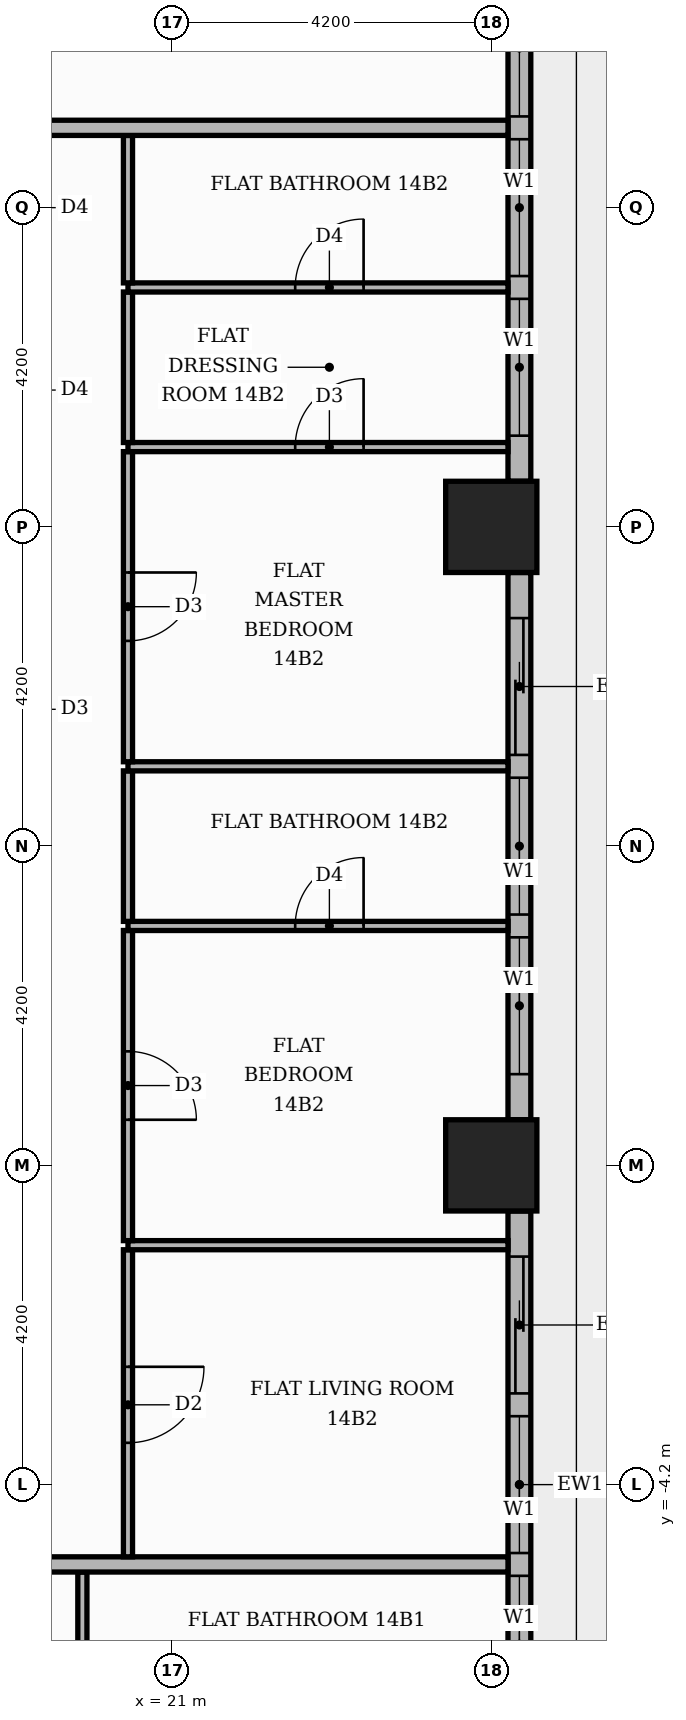
"""IFC4 building model, lengths in metres.
Left out: names, types, materials, properties, quantities, classifications, styles, units other than length and angle.
Written with IfcOpenShell. Run it as: python <this file> out.ifc"""

import sys

from ifc_helpers import new_model, si_unit, direction, frame, frame_2d, origin, origin_2d, place, context, subcontext, project, spatial, rectangle, extrude, element, fill, save


model = new_model("IFC4")
c1 = context("Model", 3, precision=1e-05, world=origin(), true_north=direction((0.0, 1.0)))
c2 = subcontext(c1, "Body", "Model", "MODEL_VIEW")
j1 = project(units=[si_unit("LENGTHUNIT", "METRE"), si_unit("PLANEANGLEUNIT", "RADIAN")], contexts=[c1])
p1 = place(None, origin())
s1 = spatial("IfcSite", under=j1, at=p1, CompositionType="ELEMENT")
p2 = place(p1, origin())
s2 = spatial("IfcBuilding", under=s1, at=p2, CompositionType="ELEMENT")
p3 = place(p2, frame((0.0, 0.0, 62.1)))
s3 = spatial("IfcBuildingStorey", under=s2, at=p3, CompositionType="ELEMENT", Elevation=62.1)
for number, where, z_axis, x_axis in (
    (1, (25.2, 0.0, 0.0), (0.0, 0.0, 1.0), (1.0, 0.0, 0.0)),
    (2, (25.2, 8.4, 0.0), (0.0, 0.0, 1.0), (1.0, 0.0, 0.0)),
):
    element("IfcColumn", number, at=place(p3, frame(where, z_axis=z_axis, x_axis=x_axis)), inside=s3, PredefinedType="COLUMN", context=c2, shape_type="SweptSolid", body=[
        extrude(rectangle(XDim=1.2, YDim=1.2, at=origin_2d()), origin(), (0.0, 0.0, 1.0), 3.9),
    ])
p4 = place(p3, frame((25.57, -7.8, 0.0), z_axis=(0.0, 0.0, 1.0), x_axis=(0.0, 1.0, 0.0)))
e3 = element("IfcWall", 3, at=p4, inside=s3, PredefinedType="STANDARD", context=c2, shape_type="SweptSolid", body=[
    extrude(rectangle(XDim=7.2, YDim=0.3, at=frame_2d((3.6, 0.0))), origin(), (0.0, 0.0, 1.0), 3.48),
])
p5 = place(p4, frame((0.6, 0.0, 0.9)))
e4 = element("IfcOpeningElement", 4, at=p5, cuts=e3, PredefinedType="OPENING", context=c2, shape_type="SweptSolid", body=[
    extrude(rectangle(XDim=1.8, YDim=2.1, at=frame_2d((0.9, 1.05))), frame((0.0, 0.16, 0.0), z_axis=(0.0, -1.0, 0.0), x_axis=(1.0, 0.0, 0.0)), (0.0, 0.0, 1.0), 0.32),
])
p6 = place(p4, frame((2.7, 0.0, 0.9)))
e5 = element("IfcOpeningElement", 5, at=p6, cuts=e3, PredefinedType="OPENING", context=c2, shape_type="SweptSolid", body=[
    extrude(rectangle(XDim=1.8, YDim=2.1, at=frame_2d((0.9, 1.05))), frame((0.0, 0.16, 0.0), z_axis=(0.0, -1.0, 0.0), x_axis=(1.0, 0.0, 0.0)), (0.0, 0.0, 1.0), 0.32),
])
p7 = place(p4, frame((4.8, 0.0, 0.0)))
e6 = element("IfcOpeningElement", 6, at=p7, cuts=e3, PredefinedType="OPENING", context=c2, shape_type="SweptSolid", body=[
    extrude(rectangle(XDim=1.8, YDim=2.4, at=frame_2d((0.9, 1.2))), frame((0.0, 0.16, 0.0), z_axis=(0.0, -1.0, 0.0), x_axis=(1.0, 0.0, 0.0)), (0.0, 0.0, 1.0), 0.32),
])
p8 = place(p3, frame((25.57, 0.6, 0.0), z_axis=(0.0, 0.0, 1.0), x_axis=(0.0, 1.0, 0.0)))
e7 = element("IfcWall", 7, at=p8, inside=s3, PredefinedType="STANDARD", context=c2, shape_type="SweptSolid", body=[
    extrude(rectangle(XDim=7.2, YDim=0.3, at=frame_2d((3.6, 0.0))), origin(), (0.0, 0.0, 1.0), 3.48),
])
p9 = place(p8, frame((0.6, 0.0, 0.9)))
e8 = element("IfcOpeningElement", 8, at=p9, cuts=e7, PredefinedType="OPENING", context=c2, shape_type="SweptSolid", body=[
    extrude(rectangle(XDim=1.8, YDim=2.1, at=frame_2d((0.9, 1.05))), frame((0.0, 0.16, 0.0), z_axis=(0.0, -1.0, 0.0), x_axis=(1.0, 0.0, 0.0)), (0.0, 0.0, 1.0), 0.32),
])
p10 = place(p8, frame((2.7, 0.0, 0.9)))
e9 = element("IfcOpeningElement", 9, at=p10, cuts=e7, PredefinedType="OPENING", context=c2, shape_type="SweptSolid", body=[
    extrude(rectangle(XDim=1.8, YDim=2.1, at=frame_2d((0.9, 1.05))), frame((0.0, 0.16, 0.0), z_axis=(0.0, -1.0, 0.0), x_axis=(1.0, 0.0, 0.0)), (0.0, 0.0, 1.0), 0.32),
])
p11 = place(p8, frame((4.8, 0.0, 0.0)))
e10 = element("IfcOpeningElement", 10, at=p11, cuts=e7, PredefinedType="OPENING", context=c2, shape_type="SweptSolid", body=[
    extrude(rectangle(XDim=1.8, YDim=2.4, at=frame_2d((0.9, 1.2))), frame((0.0, 0.16, 0.0), z_axis=(0.0, -1.0, 0.0), x_axis=(1.0, 0.0, 0.0)), (0.0, 0.0, 1.0), 0.32),
])
p12 = place(p3, frame((25.57, 9.0, 0.0), z_axis=(0.0, 0.0, 1.0), x_axis=(0.0, 1.0, 0.0)))
e11 = element("IfcWall", 11, at=p12, inside=s3, PredefinedType="STANDARD", context=c2, shape_type="SweptSolid", body=[
    extrude(rectangle(XDim=7.2, YDim=0.3, at=frame_2d((3.6, 0.0))), origin(), (0.0, 0.0, 1.0), 3.48),
])
p13 = place(p12, frame((0.6, 0.0, 0.9)))
e12 = element("IfcOpeningElement", 12, at=p13, cuts=e11, PredefinedType="OPENING", context=c2, shape_type="SweptSolid", body=[
    extrude(rectangle(XDim=1.8, YDim=2.1, at=frame_2d((0.9, 1.05))), frame((0.0, 0.16, 0.0), z_axis=(0.0, -1.0, 0.0), x_axis=(1.0, 0.0, 0.0)), (0.0, 0.0, 1.0), 0.32),
])
p14 = place(p12, frame((2.7, 0.0, 0.9)))
e13 = element("IfcOpeningElement", 13, at=p14, cuts=e11, PredefinedType="OPENING", context=c2, shape_type="SweptSolid", body=[
    extrude(rectangle(XDim=1.8, YDim=2.1, at=frame_2d((0.9, 1.05))), frame((0.0, 0.16, 0.0), z_axis=(0.0, -1.0, 0.0), x_axis=(1.0, 0.0, 0.0)), (0.0, 0.0, 1.0), 0.32),
])
p15 = place(p12, frame((4.8, 0.0, 0.9)))
e14 = element("IfcOpeningElement", 14, at=p15, cuts=e11, PredefinedType="OPENING", context=c2, shape_type="SweptSolid", body=[
    extrude(rectangle(XDim=1.8, YDim=2.1, at=frame_2d((0.9, 1.05))), frame((0.0, 0.16, 0.0), z_axis=(0.0, -1.0, 0.0), x_axis=(1.0, 0.0, 0.0)), (0.0, 0.0, 1.0), 0.32),
])
p16 = place(p3, frame((19.82, -7.29, 0.0), z_axis=(0.0, 0.0, 1.0), x_axis=(0.0, 1.0, 0.0)))
e15 = element("IfcWall", 15, at=p16, inside=s3, PredefinedType="PARTITIONING", context=c2, shape_type="SweptSolid", body=[
    extrude(rectangle(XDim=1.94, YDim=0.12, at=frame_2d((0.97, 0.0))), origin(), (0.0, 0.0, 1.0), 3.48),
])
p17 = place(p3, frame((13.65, -5.25, 0.0), z_axis=(0.0, 0.0, 1.0), x_axis=(1.0, 0.0, 0.0)))
e16 = element("IfcWall", 16, at=p17, inside=s3, PredefinedType="PARTITIONING", context=c2, shape_type="SweptSolid", body=[
    extrude(rectangle(XDim=11.77, YDim=0.2, at=frame_2d((5.885, 0.0))), origin(), (0.0, 0.0, 1.0), 3.48),
])
p18 = place(p3, frame((20.42, -5.15, 0.0), z_axis=(0.0, 0.0, 1.0), x_axis=(0.0, 1.0, 0.0)))
e17 = element("IfcWall", 17, at=p18, inside=s3, PredefinedType="PARTITIONING", context=c2, shape_type="SweptSolid", body=[
    extrude(rectangle(XDim=4.04, YDim=0.12, at=frame_2d((2.02, 0.0))), origin(), (0.0, 0.0, 1.0), 3.48),
])
p19 = place(p18, frame((1.5, 0.0, 0.0)))
e18 = element("IfcOpeningElement", 18, at=p19, cuts=e17, PredefinedType="OPENING", context=c2, shape_type="SweptSolid", body=[
    extrude(rectangle(XDim=1.0, YDim=2.1, at=frame_2d((0.5, 1.05))), frame((0.0, 0.07, 0.0), z_axis=(0.0, -1.0, 0.0), x_axis=(1.0, 0.0, 0.0)), (0.0, 0.0, 1.0), 0.14),
])
p20 = place(p3, frame((20.42, -1.05, 0.0), z_axis=(0.0, 0.0, 1.0), x_axis=(1.0, 0.0, 0.0)))
e19 = element("IfcWall", 19, at=p20, inside=s3, PredefinedType="PARTITIONING", context=c2, shape_type="SweptSolid", body=[
    extrude(rectangle(XDim=5.0, YDim=0.12, at=frame_2d((2.5, 0.0))), origin(), (0.0, 0.0, 1.0), 3.48),
])
p21 = place(p3, frame((20.42, -0.99, 0.0), z_axis=(0.0, 0.0, 1.0), x_axis=(0.0, 1.0, 0.0)))
e20 = element("IfcWall", 20, at=p21, inside=s3, PredefinedType="PARTITIONING", context=c2, shape_type="SweptSolid", body=[
    extrude(rectangle(XDim=4.08, YDim=0.12, at=frame_2d((2.04, 0.0))), origin(), (0.0, 0.0, 1.0), 3.48),
])
p22 = place(p21, frame((1.59, 0.0, 0.0)))
e21 = element("IfcOpeningElement", 21, at=p22, cuts=e20, PredefinedType="OPENING", context=c2, shape_type="SweptSolid", body=[
    extrude(rectangle(XDim=0.9, YDim=2.1, at=frame_2d((0.45, 1.05))), frame((0.0, 0.07, 0.0), z_axis=(0.0, -1.0, 0.0), x_axis=(1.0, 0.0, 0.0)), (0.0, 0.0, 1.0), 0.14),
])
p23 = place(p3, frame((20.42, 3.15, 0.0), z_axis=(0.0, 0.0, 1.0), x_axis=(1.0, 0.0, 0.0)))
e22 = element("IfcWall", 22, at=p23, inside=s3, PredefinedType="PARTITIONING", context=c2, shape_type="SweptSolid", body=[
    extrude(rectangle(XDim=5.0, YDim=0.12, at=frame_2d((2.5, 0.0))), origin(), (0.0, 0.0, 1.0), 3.48),
])
p24 = place(p23, frame((2.2, 0.0, 0.0)))
e23 = element("IfcOpeningElement", 23, at=p24, cuts=e22, PredefinedType="OPENING", context=c2, shape_type="SweptSolid", body=[
    extrude(rectangle(XDim=0.9, YDim=2.1, at=frame_2d((0.45, 1.05))), frame((0.0, 0.07, 0.0), z_axis=(0.0, -1.0, 0.0), x_axis=(1.0, 0.0, 0.0)), (0.0, 0.0, 1.0), 0.14),
])
p25 = place(p3, frame((20.42, 3.21, 0.0), z_axis=(0.0, 0.0, 1.0), x_axis=(0.0, 1.0, 0.0)))
e24 = element("IfcWall", 24, at=p25, inside=s3, PredefinedType="PARTITIONING", context=c2, shape_type="SweptSolid", body=[
    extrude(rectangle(XDim=1.98, YDim=0.12, at=frame_2d((0.99, 0.0))), origin(), (0.0, 0.0, 1.0), 3.48),
])
p26 = place(p3, frame((20.42, 5.25, 0.0), z_axis=(0.0, 0.0, 1.0), x_axis=(1.0, 0.0, 0.0)))
e25 = element("IfcWall", 25, at=p26, inside=s3, PredefinedType="PARTITIONING", context=c2, shape_type="SweptSolid", body=[
    extrude(rectangle(XDim=5.0, YDim=0.12, at=frame_2d((2.5, 0.0))), origin(), (0.0, 0.0, 1.0), 3.48),
])
p27 = place(p3, frame((20.42, 5.31, 0.0), z_axis=(0.0, 0.0, 1.0), x_axis=(0.0, 1.0, 0.0)))
e26 = element("IfcWall", 26, at=p27, inside=s3, PredefinedType="PARTITIONING", context=c2, shape_type="SweptSolid", body=[
    extrude(rectangle(XDim=4.08, YDim=0.12, at=frame_2d((2.04, 0.0))), origin(), (0.0, 0.0, 1.0), 3.48),
])
p28 = place(p27, frame((1.59, 0.0, 0.0)))
e27 = element("IfcOpeningElement", 27, at=p28, cuts=e26, PredefinedType="OPENING", context=c2, shape_type="SweptSolid", body=[
    extrude(rectangle(XDim=0.9, YDim=2.1, at=frame_2d((0.45, 1.05))), frame((0.0, 0.07, 0.0), z_axis=(0.0, -1.0, 0.0), x_axis=(1.0, 0.0, 0.0)), (0.0, 0.0, 1.0), 0.14),
])
p29 = place(p3, frame((20.42, 9.45, 0.0), z_axis=(0.0, 0.0, 1.0), x_axis=(1.0, 0.0, 0.0)))
e28 = element("IfcWall", 28, at=p29, inside=s3, PredefinedType="PARTITIONING", context=c2, shape_type="SweptSolid", body=[
    extrude(rectangle(XDim=5.0, YDim=0.12, at=frame_2d((2.5, 0.0))), origin(), (0.0, 0.0, 1.0), 3.48),
])
p30 = place(p29, frame((2.2, 0.0, 0.0)))
e29 = element("IfcOpeningElement", 29, at=p30, cuts=e28, PredefinedType="OPENING", context=c2, shape_type="SweptSolid", body=[
    extrude(rectangle(XDim=0.9, YDim=2.1, at=frame_2d((0.45, 1.05))), frame((0.0, 0.07, 0.0), z_axis=(0.0, -1.0, 0.0), x_axis=(1.0, 0.0, 0.0)), (0.0, 0.0, 1.0), 0.14),
])
p31 = place(p3, frame((20.42, 9.51, 0.0), z_axis=(0.0, 0.0, 1.0), x_axis=(0.0, 1.0, 0.0)))
e30 = element("IfcWall", 30, at=p31, inside=s3, PredefinedType="PARTITIONING", context=c2, shape_type="SweptSolid", body=[
    extrude(rectangle(XDim=1.98, YDim=0.12, at=frame_2d((0.99, 0.0))), origin(), (0.0, 0.0, 1.0), 3.48),
])
p32 = place(p3, frame((20.42, 11.55, 0.0), z_axis=(0.0, 0.0, 1.0), x_axis=(1.0, 0.0, 0.0)))
e31 = element("IfcWall", 31, at=p32, inside=s3, PredefinedType="PARTITIONING", context=c2, shape_type="SweptSolid", body=[
    extrude(rectangle(XDim=5.0, YDim=0.12, at=frame_2d((2.5, 0.0))), origin(), (0.0, 0.0, 1.0), 3.48),
])
p33 = place(p32, frame((2.2, 0.0, 0.0)))
e32 = element("IfcOpeningElement", 32, at=p33, cuts=e31, PredefinedType="OPENING", context=c2, shape_type="SweptSolid", body=[
    extrude(rectangle(XDim=0.9, YDim=2.1, at=frame_2d((0.45, 1.05))), frame((0.0, 0.07, 0.0), z_axis=(0.0, -1.0, 0.0), x_axis=(1.0, 0.0, 0.0)), (0.0, 0.0, 1.0), 0.14),
])
p34 = place(p3, frame((20.42, 11.61, 0.0), z_axis=(0.0, 0.0, 1.0), x_axis=(0.0, 1.0, 0.0)))
e33 = element("IfcWall", 33, at=p34, inside=s3, PredefinedType="PARTITIONING", context=c2, shape_type="SweptSolid", body=[
    extrude(rectangle(XDim=1.94, YDim=0.12, at=frame_2d((0.97, 0.0))), origin(), (0.0, 0.0, 1.0), 3.48),
])
p35 = place(p3, frame((-13.65, 13.65, 0.0), z_axis=(0.0, 0.0, 1.0), x_axis=(1.0, 0.0, 0.0)))
e34 = element("IfcWall", 34, at=p35, inside=s3, PredefinedType="PARTITIONING", context=c2, shape_type="SweptSolid", body=[
    extrude(rectangle(XDim=39.07, YDim=0.2, at=frame_2d((19.535, 0.0))), origin(), (0.0, 0.0, 1.0), 3.48),
])
p36 = place(p35, frame((23.6, 0.0, 0.0)))
e35 = element("IfcOpeningElement", 35, at=p36, cuts=e34, PredefinedType="OPENING", context=c2, shape_type="SweptSolid", body=[
    extrude(rectangle(XDim=1.1, YDim=2.4, at=frame_2d((0.55, 1.2))), frame((0.0, 0.11, 0.0), z_axis=(0.0, -1.0, 0.0), x_axis=(1.0, 0.0, 0.0)), (0.0, 0.0, 1.0), 0.22),
])
p37 = place(p5, origin())
e36 = element("IfcWindow", 36, at=p37, inside=s3, PartitioningType="SINGLE_PANEL", PredefinedType="WINDOW", context=c2, shape_type="SweptSolid", body=[
    extrude(rectangle(XDim=1.8, YDim=2.1, at=frame_2d((0.9, 1.05))), frame((0.0, 0.03, 0.0), z_axis=(0.0, -1.0, 0.0), x_axis=(1.0, 0.0, 0.0)), (0.0, 0.0, 1.0), 0.06),
])
fill(e4, e36)
p38 = place(p6, origin())
e37 = element("IfcWindow", 37, at=p38, inside=s3, PartitioningType="SINGLE_PANEL", PredefinedType="WINDOW", context=c2, shape_type="SweptSolid", body=[
    extrude(rectangle(XDim=1.8, YDim=2.1, at=frame_2d((0.9, 1.05))), frame((0.0, 0.03, 0.0), z_axis=(0.0, -1.0, 0.0), x_axis=(1.0, 0.0, 0.0)), (0.0, 0.0, 1.0), 0.06),
])
fill(e5, e37)
p39 = place(p7, origin())
e38 = element("IfcDoor", 38, at=p39, inside=s3, OperationType="SLIDING_TO_RIGHT", PredefinedType="DOOR", context=c2, shape_type="SweptSolid", body=[
    extrude(rectangle(XDim=1.8, YDim=2.4, at=frame_2d((0.9, 1.2))), frame((0.0, 0.025, 0.0), z_axis=(0.0, -1.0, 0.0), x_axis=(1.0, 0.0, 0.0)), (0.0, 0.0, 1.0), 0.05),
])
fill(e6, e38)
p40 = place(p9, origin())
e39 = element("IfcWindow", 39, at=p40, inside=s3, PartitioningType="SINGLE_PANEL", PredefinedType="WINDOW", context=c2, shape_type="SweptSolid", body=[
    extrude(rectangle(XDim=1.8, YDim=2.1, at=frame_2d((0.9, 1.05))), frame((0.0, 0.03, 0.0), z_axis=(0.0, -1.0, 0.0), x_axis=(1.0, 0.0, 0.0)), (0.0, 0.0, 1.0), 0.06),
])
fill(e8, e39)
p41 = place(p10, origin())
e40 = element("IfcWindow", 40, at=p41, inside=s3, PartitioningType="SINGLE_PANEL", PredefinedType="WINDOW", context=c2, shape_type="SweptSolid", body=[
    extrude(rectangle(XDim=1.8, YDim=2.1, at=frame_2d((0.9, 1.05))), frame((0.0, 0.03, 0.0), z_axis=(0.0, -1.0, 0.0), x_axis=(1.0, 0.0, 0.0)), (0.0, 0.0, 1.0), 0.06),
])
fill(e9, e40)
p42 = place(p11, origin())
e41 = element("IfcDoor", 41, at=p42, inside=s3, OperationType="SLIDING_TO_RIGHT", PredefinedType="DOOR", context=c2, shape_type="SweptSolid", body=[
    extrude(rectangle(XDim=1.8, YDim=2.4, at=frame_2d((0.9, 1.2))), frame((0.0, 0.025, 0.0), z_axis=(0.0, -1.0, 0.0), x_axis=(1.0, 0.0, 0.0)), (0.0, 0.0, 1.0), 0.05),
])
fill(e10, e41)
p43 = place(p13, origin())
e42 = element("IfcWindow", 42, at=p43, inside=s3, PartitioningType="SINGLE_PANEL", PredefinedType="WINDOW", context=c2, shape_type="SweptSolid", body=[
    extrude(rectangle(XDim=1.8, YDim=2.1, at=frame_2d((0.9, 1.05))), frame((0.0, 0.03, 0.0), z_axis=(0.0, -1.0, 0.0), x_axis=(1.0, 0.0, 0.0)), (0.0, 0.0, 1.0), 0.06),
])
fill(e12, e42)
p44 = place(p14, origin())
e43 = element("IfcWindow", 43, at=p44, inside=s3, PartitioningType="SINGLE_PANEL", PredefinedType="WINDOW", context=c2, shape_type="SweptSolid", body=[
    extrude(rectangle(XDim=1.8, YDim=2.1, at=frame_2d((0.9, 1.05))), frame((0.0, 0.03, 0.0), z_axis=(0.0, -1.0, 0.0), x_axis=(1.0, 0.0, 0.0)), (0.0, 0.0, 1.0), 0.06),
])
fill(e13, e43)
p45 = place(p15, origin())
e44 = element("IfcWindow", 44, at=p45, inside=s3, PartitioningType="SINGLE_PANEL", PredefinedType="WINDOW", context=c2, shape_type="SweptSolid", body=[
    extrude(rectangle(XDim=1.8, YDim=2.1, at=frame_2d((0.9, 1.05))), frame((0.0, 0.03, 0.0), z_axis=(0.0, -1.0, 0.0), x_axis=(1.0, 0.0, 0.0)), (0.0, 0.0, 1.0), 0.06),
])
fill(e14, e44)
p46 = place(p19, frame((1.0, 0.0, 0.0), z_axis=(0.0, 0.0, 1.0), x_axis=(-1.0, 0.0, 0.0)))
e45 = element("IfcDoor", 45, at=p46, inside=s3, OperationType="SINGLE_SWING_RIGHT", PredefinedType="DOOR", context=c2, shape_type="SweptSolid", body=[
    extrude(rectangle(XDim=1.0, YDim=2.1, at=frame_2d((0.5, 1.05))), frame((0.0, 0.025, 0.0), z_axis=(0.0, -1.0, 0.0), x_axis=(1.0, 0.0, 0.0)), (0.0, 0.0, 1.0), 0.05),
])
fill(e18, e45)
p47 = place(p22, frame((0.9, 0.0, 0.0), z_axis=(0.0, 0.0, 1.0), x_axis=(-1.0, 0.0, 0.0)))
e46 = element("IfcDoor", 46, at=p47, inside=s3, OperationType="SINGLE_SWING_LEFT", PredefinedType="DOOR", context=c2, shape_type="SweptSolid", body=[
    extrude(rectangle(XDim=0.9, YDim=2.1, at=frame_2d((0.45, 1.05))), frame((0.0, 0.025, 0.0), z_axis=(0.0, -1.0, 0.0), x_axis=(1.0, 0.0, 0.0)), (0.0, 0.0, 1.0), 0.05),
])
fill(e21, e46)
p48 = place(p24, origin())
e47 = element("IfcDoor", 47, at=p48, inside=s3, OperationType="SINGLE_SWING_RIGHT", PredefinedType="DOOR", context=c2, shape_type="SweptSolid", body=[
    extrude(rectangle(XDim=0.9, YDim=2.1, at=frame_2d((0.45, 1.05))), frame((0.0, 0.025, 0.0), z_axis=(0.0, -1.0, 0.0), x_axis=(1.0, 0.0, 0.0)), (0.0, 0.0, 1.0), 0.05),
])
fill(e23, e47)
p49 = place(p28, frame((0.9, 0.0, 0.0), z_axis=(0.0, 0.0, 1.0), x_axis=(-1.0, 0.0, 0.0)))
e48 = element("IfcDoor", 48, at=p49, inside=s3, OperationType="SINGLE_SWING_RIGHT", PredefinedType="DOOR", context=c2, shape_type="SweptSolid", body=[
    extrude(rectangle(XDim=0.9, YDim=2.1, at=frame_2d((0.45, 1.05))), frame((0.0, 0.025, 0.0), z_axis=(0.0, -1.0, 0.0), x_axis=(1.0, 0.0, 0.0)), (0.0, 0.0, 1.0), 0.05),
])
fill(e27, e48)
p50 = place(p30, origin())
e49 = element("IfcDoor", 49, at=p50, inside=s3, OperationType="SINGLE_SWING_RIGHT", PredefinedType="DOOR", context=c2, shape_type="SweptSolid", body=[
    extrude(rectangle(XDim=0.9, YDim=2.1, at=frame_2d((0.45, 1.05))), frame((0.0, 0.025, 0.0), z_axis=(0.0, -1.0, 0.0), x_axis=(1.0, 0.0, 0.0)), (0.0, 0.0, 1.0), 0.05),
])
fill(e29, e49)
p51 = place(p33, origin())
e50 = element("IfcDoor", 50, at=p51, inside=s3, OperationType="SINGLE_SWING_RIGHT", PredefinedType="DOOR", context=c2, shape_type="SweptSolid", body=[
    extrude(rectangle(XDim=0.9, YDim=2.1, at=frame_2d((0.45, 1.05))), frame((0.0, 0.025, 0.0), z_axis=(0.0, -1.0, 0.0), x_axis=(1.0, 0.0, 0.0)), (0.0, 0.0, 1.0), 0.05),
])
fill(e32, e50)
save(model, sys.argv[1])
